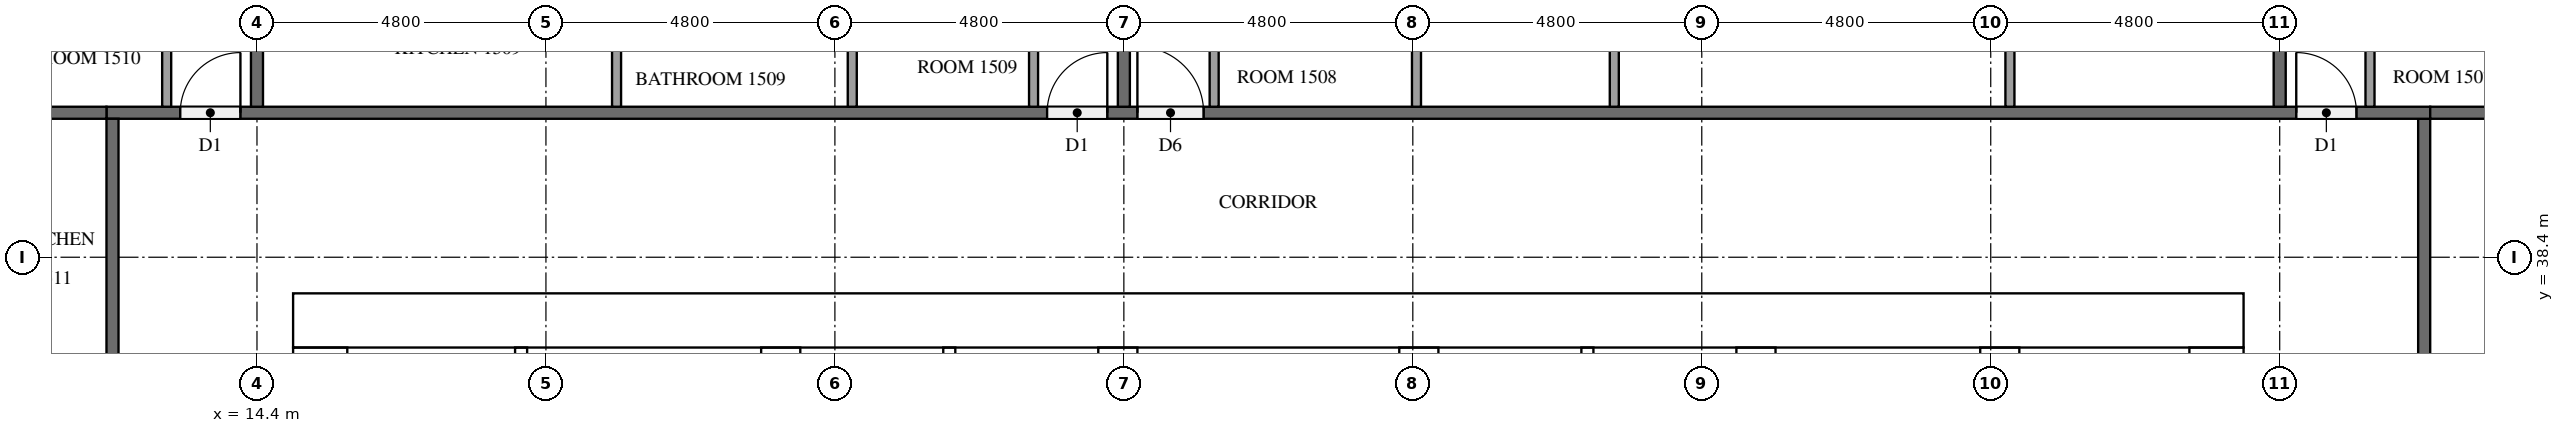
"""IFC4 building model, lengths in metres.
Left out: names, types, materials, properties, quantities, classifications, styles, units other than length and angle.
Written with IfcOpenShell. Run it as: python <this file> out.ifc"""

import sys

from ifc_helpers import new_model, si_unit, direction, frame, frame_2d, origin, place, context, subcontext, project, spatial, rectangle, extrude, element, fill, save


model = new_model("IFC4")
c1 = context("Model", 3, precision=1e-05, world=origin(), true_north=direction((0.0, 1.0)))
c2 = subcontext(c1, "Body", "Model", "MODEL_VIEW")
j1 = project(units=[si_unit("LENGTHUNIT", "METRE"), si_unit("PLANEANGLEUNIT", "RADIAN")], contexts=[c1])
p1 = place(None, origin())
s1 = spatial("IfcSite", under=j1, at=p1, CompositionType="ELEMENT")
p2 = place(p1, origin())
s2 = spatial("IfcBuilding", under=s1, at=p2, CompositionType="ELEMENT")
p3 = place(p2, frame((0.0, 0.0, 62.8)))
s3 = spatial("IfcBuildingStorey", under=s2, at=p3, CompositionType="ELEMENT", Elevation=62.8)
p4 = place(p3, frame((15.0, 37.35, 0.0), z_axis=(0.0, 0.0, 1.0), x_axis=(1.0, 0.0, 0.0)))
e1 = element("IfcWall", 1, at=p4, inside=s3, PredefinedType="SHEAR", context=c2, shape_type="SweptSolid", body=[
    extrude(rectangle(XDim=32.4, YDim=0.9, at=frame_2d((16.2, 0.0))), origin(), (0.0, 0.0, 1.0), 3.2),
])
p5 = place(p4, frame((15.3, 0.0, 0.0)))
e2 = element("IfcOpeningElement", 2, at=p5, cuts=e1, PredefinedType="OPENING", context=c2, shape_type="SweptSolid", body=[
    extrude(rectangle(XDim=1.8, YDim=2.1, at=frame_2d((0.9, 1.05))), frame((0.0, 0.46, 0.0), z_axis=(0.0, -1.0, 0.0), x_axis=(1.0, 0.0, 0.0)), (0.0, 0.0, 1.0), 0.92),
])
p6 = place(p4, frame((1.794, 0.0, 0.0)))
e3 = element("IfcOpeningElement", 3, at=p6, cuts=e1, PredefinedType="OPENING", context=c2, shape_type="SweptSolid", body=[
    extrude(rectangle(XDim=1.0, YDim=2.1, at=frame_2d((0.5, 1.05))), frame((0.0, 0.46, 0.0), z_axis=(0.0, -1.0, 0.0), x_axis=(1.0, 0.0, 0.0)), (0.0, 0.0, 1.0), 0.92),
])
p7 = place(p4, frame((5.331, 0.0, 0.0)))
e4 = element("IfcOpeningElement", 4, at=p7, cuts=e1, PredefinedType="OPENING", context=c2, shape_type="SweptSolid", body=[
    extrude(rectangle(XDim=1.0, YDim=2.1, at=frame_2d((0.5, 1.05))), frame((0.0, 0.46, 0.0), z_axis=(0.0, -1.0, 0.0), x_axis=(1.0, 0.0, 0.0)), (0.0, 0.0, 1.0), 0.92),
])
p8 = place(p3, frame((15.45, 15.9, 0.0), z_axis=(0.0, 0.0, 1.0), x_axis=(0.0, 1.0, 0.0)))
e5 = element("IfcWall", 5, at=p8, inside=s3, PredefinedType="SHEAR", context=c2, shape_type="SweptSolid", body=[
    extrude(rectangle(XDim=21.0, YDim=0.9, at=frame_2d((10.5, 0.0))), origin(), (0.0, 0.0, 1.0), 3.2),
])
p9 = place(p8, frame((4.86, 0.0, 0.0)))
e6 = element("IfcOpeningElement", 6, at=p9, cuts=e5, PredefinedType="OPENING", context=c2, shape_type="SweptSolid", body=[
    extrude(rectangle(XDim=1.2, YDim=2.1, at=frame_2d((0.6, 1.05))), frame((0.0, 0.46, 0.0), z_axis=(0.0, -1.0, 0.0), x_axis=(1.0, 0.0, 0.0)), (0.0, 0.0, 1.0), 0.92),
])
p10 = place(p3, frame((46.95, 15.9, 0.0), z_axis=(0.0, 0.0, 1.0), x_axis=(0.0, 1.0, 0.0)))
e7 = element("IfcWall", 7, at=p10, inside=s3, PredefinedType="SHEAR", context=c2, shape_type="SweptSolid", body=[
    extrude(rectangle(XDim=21.0, YDim=0.9, at=frame_2d((10.5, 0.0))), origin(), (0.0, 0.0, 1.0), 3.2),
])
p11 = place(p10, frame((10.2, 0.0, 0.0)))
e8 = element("IfcOpeningElement", 8, at=p11, cuts=e7, PredefinedType="OPENING", context=c2, shape_type="SweptSolid", body=[
    extrude(rectangle(XDim=1.2, YDim=2.1, at=frame_2d((0.6, 1.05))), frame((0.0, 0.46, 0.0), z_axis=(0.0, -1.0, 0.0), x_axis=(1.0, 0.0, 0.0)), (0.0, 0.0, 1.0), 0.92),
])
p12 = place(p3, frame((23.1, 15.9, 0.0), z_axis=(0.0, 0.0, 1.0), x_axis=(0.0, 1.0, 0.0)))
e9 = element("IfcWall", 9, at=p12, inside=s3, PredefinedType="SHEAR", context=c2, shape_type="SweptSolid", body=[
    extrude(rectangle(XDim=21.0, YDim=0.65, at=frame_2d((10.5, 0.0))), origin(), (0.0, 0.0, 1.0), 3.2),
])
p13 = place(p3, frame((39.3, 27.75, 0.0), z_axis=(0.0, 0.0, 1.0), x_axis=(0.0, 1.0, 0.0)))
e10 = element("IfcWall", 10, at=p13, inside=s3, PredefinedType="SHEAR", context=c2, shape_type="SweptSolid", body=[
    extrude(rectangle(XDim=9.15, YDim=0.65, at=frame_2d((4.575, 0.0))), origin(), (0.0, 0.0, 1.0), 3.2),
])
p14 = place(p3, frame((43.35, 27.75, 0.0), z_axis=(0.0, 0.0, 1.0), x_axis=(0.0, 1.0, 0.0)))
e11 = element("IfcWall", 11, at=p14, inside=s3, PredefinedType="SHEAR", context=c2, shape_type="SweptSolid", body=[
    extrude(rectangle(XDim=9.15, YDim=0.65, at=frame_2d((4.575, 0.0))), origin(), (0.0, 0.0, 1.0), 3.2),
])
p15 = place(p14, frame((7.65, 0.0, 0.0)))
e12 = element("IfcOpeningElement", 12, at=p15, cuts=e11, PredefinedType="OPENING", context=c2, shape_type="SweptSolid", body=[
    extrude(rectangle(XDim=1.2, YDim=2.1, at=frame_2d((0.6, 1.05))), frame((0.0, 0.335, 0.0), z_axis=(0.0, -1.0, 0.0), x_axis=(1.0, 0.0, 0.0)), (0.0, 0.0, 1.0), 0.67),
])
for number, where, z_axis, x_axis in (
    (13, (28.7, 33.875, 0.0), (0.0, 0.0, 1.0), (0.0, 1.0, 0.0)),
    (14, (33.7, 33.875, 0.0), (0.0, 0.0, 1.0), (0.0, 1.0, 0.0)),
):
    element("IfcWall", number, at=place(p3, frame(where, z_axis=z_axis, x_axis=x_axis)), inside=s3, PredefinedType="SHEAR", context=c2, shape_type="SweptSolid", body=[
        extrude(rectangle(XDim=3.025, YDim=0.65, at=frame_2d((1.512, 0.0))), origin(), (0.0, 0.0, 1.0), 3.2),
    ])
for number, where, z_axis, x_axis in (
    (15, (25.9, 33.875, 0.0), (0.0, 0.0, 1.0), (0.0, 1.0, 0.0)),
    (16, (36.5, 33.875, 0.0), (0.0, 0.0, 1.0), (0.0, 1.0, 0.0)),
):
    element("IfcWall", number, at=place(p3, frame(where, z_axis=z_axis, x_axis=x_axis)), inside=s3, PredefinedType="SOLIDWALL", context=c2, shape_type="SweptSolid", body=[
        extrude(rectangle(XDim=3.025, YDim=0.2, at=frame_2d((1.512, 0.0))), origin(), (0.0, 0.0, 1.0), 3.2),
    ])
p16 = place(p3, frame((18.788, 31.575, 0.0), z_axis=(0.0, 0.0, 1.0), x_axis=(0.0, 1.0, 0.0)))
e17 = element("IfcWall", 17, at=p16, inside=s3, PredefinedType="PARTITIONING", context=c2, shape_type="SweptSolid", body=[
    extrude(rectangle(XDim=5.325, YDim=0.2, at=frame_2d((2.663, 0.0))), origin(), (0.0, 0.0, 1.0), 3.2),
])
p17 = place(p3, frame((50.4, 40.7, 0.0), z_axis=(0.0, 0.0, 1.0), x_axis=(0.0, -1.0, 0.0)))
e18 = element("IfcWall", 18, at=p17, inside=s3, PredefinedType="PARTITIONING", context=c2, shape_type="SweptSolid", body=[
    extrude(rectangle(XDim=28.6, YDim=0.2, at=frame_2d((14.3, 0.0))), origin(), (0.0, 0.0, 1.0), 3.2),
])
p18 = place(p17, frame((24.175, 0.0, 0.0)))
e19 = element("IfcOpeningElement", 19, at=p18, cuts=e18, PredefinedType="OPENING", context=c2, shape_type="SweptSolid", body=[
    extrude(rectangle(XDim=1.0, YDim=2.1, at=frame_2d((0.5, 1.05))), frame((0.0, 0.11, 0.0), z_axis=(0.0, -1.0, 0.0), x_axis=(1.0, 0.0, 0.0)), (0.0, 0.0, 1.0), 0.22),
])
p19 = place(p17, frame((22.625, 0.0, 0.0)))
e20 = element("IfcOpeningElement", 20, at=p19, cuts=e18, PredefinedType="OPENING", context=c2, shape_type="SweptSolid", body=[
    extrude(rectangle(XDim=1.0, YDim=2.1, at=frame_2d((0.5, 1.05))), frame((0.0, 0.11, 0.0), z_axis=(0.0, -1.0, 0.0), x_axis=(1.0, 0.0, 0.0)), (0.0, 0.0, 1.0), 0.22),
])
p20 = place(p17, frame((10.625, 0.0, 0.0)))
e21 = element("IfcOpeningElement", 21, at=p20, cuts=e18, PredefinedType="OPENING", context=c2, shape_type="SweptSolid", body=[
    extrude(rectangle(XDim=1.0, YDim=2.1, at=frame_2d((0.5, 1.05))), frame((0.0, 0.11, 0.0), z_axis=(0.0, -1.0, 0.0), x_axis=(1.0, 0.0, 0.0)), (0.0, 0.0, 1.0), 0.22),
])
p21 = place(p3, frame((11.9, 40.8, 0.0), z_axis=(0.0, 0.0, 1.0), x_axis=(1.0, 0.0, 0.0)))
e22 = element("IfcWall", 22, at=p21, inside=s3, PredefinedType="PARTITIONING", context=c2, shape_type="SweptSolid", body=[
    extrude(rectangle(XDim=38.6, YDim=0.2, at=frame_2d((19.3, 0.0))), origin(), (0.0, 0.0, 1.0), 3.2),
])
p22 = place(p21, frame((36.375, 0.0, 0.0)))
e23 = element("IfcOpeningElement", 23, at=p22, cuts=e22, PredefinedType="OPENING", context=c2, shape_type="SweptSolid", body=[
    extrude(rectangle(XDim=1.0, YDim=2.1, at=frame_2d((0.5, 1.05))), frame((0.0, 0.11, 0.0), z_axis=(0.0, -1.0, 0.0), x_axis=(1.0, 0.0, 0.0)), (0.0, 0.0, 1.0), 0.22),
])
p23 = place(p21, frame((17.125, 0.0, 0.0)))
e24 = element("IfcOpeningElement", 24, at=p23, cuts=e22, PredefinedType="OPENING", context=c2, shape_type="SweptSolid", body=[
    extrude(rectangle(XDim=1.1, YDim=2.1, at=frame_2d((0.55, 1.05))), frame((0.0, 0.11, 0.0), z_axis=(0.0, -1.0, 0.0), x_axis=(1.0, 0.0, 0.0)), (0.0, 0.0, 1.0), 0.22),
])
p24 = place(p21, frame((15.625, 0.0, 0.0)))
e25 = element("IfcOpeningElement", 25, at=p24, cuts=e22, PredefinedType="OPENING", context=c2, shape_type="SweptSolid", body=[
    extrude(rectangle(XDim=1.0, YDim=2.1, at=frame_2d((0.5, 1.05))), frame((0.0, 0.11, 0.0), z_axis=(0.0, -1.0, 0.0), x_axis=(1.0, 0.0, 0.0)), (0.0, 0.0, 1.0), 0.22),
])
p25 = place(p21, frame((1.225, 0.0, 0.0)))
e26 = element("IfcOpeningElement", 26, at=p25, cuts=e22, PredefinedType="OPENING", context=c2, shape_type="SweptSolid", body=[
    extrude(rectangle(XDim=1.0, YDim=2.1, at=frame_2d((0.5, 1.05))), frame((0.0, 0.11, 0.0), z_axis=(0.0, -1.0, 0.0), x_axis=(1.0, 0.0, 0.0)), (0.0, 0.0, 1.0), 0.22),
])
p26 = place(p3, frame((12.0, 12.1, 0.0), z_axis=(0.0, 0.0, 1.0), x_axis=(0.0, 1.0, 0.0)))
e27 = element("IfcWall", 27, at=p26, inside=s3, PredefinedType="PARTITIONING", context=c2, shape_type="SweptSolid", body=[
    extrude(rectangle(XDim=28.6, YDim=0.2, at=frame_2d((14.3, 0.0))), origin(), (0.0, 0.0, 1.0), 3.2),
])
p27 = place(p26, frame((19.375, 0.0, 0.0)))
e28 = element("IfcOpeningElement", 28, at=p27, cuts=e27, PredefinedType="OPENING", context=c2, shape_type="SweptSolid", body=[
    extrude(rectangle(XDim=1.0, YDim=2.1, at=frame_2d((0.5, 1.05))), frame((0.0, 0.11, 0.0), z_axis=(0.0, -1.0, 0.0), x_axis=(1.0, 0.0, 0.0)), (0.0, 0.0, 1.0), 0.22),
])
p28 = place(p26, frame((12.175, 0.0, 0.0)))
e29 = element("IfcOpeningElement", 29, at=p28, cuts=e27, PredefinedType="OPENING", context=c2, shape_type="SweptSolid", body=[
    extrude(rectangle(XDim=1.0, YDim=2.1, at=frame_2d((0.5, 1.05))), frame((0.0, 0.11, 0.0), z_axis=(0.0, -1.0, 0.0), x_axis=(1.0, 0.0, 0.0)), (0.0, 0.0, 1.0), 0.22),
])
p29 = place(p26, frame((2.575, 0.0, 0.0)))
e30 = element("IfcOpeningElement", 30, at=p29, cuts=e27, PredefinedType="OPENING", context=c2, shape_type="SweptSolid", body=[
    extrude(rectangle(XDim=1.0, YDim=2.1, at=frame_2d((0.5, 1.05))), frame((0.0, 0.11, 0.0), z_axis=(0.0, -1.0, 0.0), x_axis=(1.0, 0.0, 0.0)), (0.0, 0.0, 1.0), 0.22),
])
p30 = place(p26, frame((1.025, 0.0, 0.0)))
e31 = element("IfcOpeningElement", 31, at=p30, cuts=e27, PredefinedType="OPENING", context=c2, shape_type="SweptSolid", body=[
    extrude(rectangle(XDim=1.0, YDim=2.1, at=frame_2d((0.5, 1.05))), frame((0.0, 0.11, 0.0), z_axis=(0.0, -1.0, 0.0), x_axis=(1.0, 0.0, 0.0)), (0.0, 0.0, 1.0), 0.22),
])
p31 = place(p3, frame((50.5, 40.8, 0.0), z_axis=(0.0, 0.0, 1.0), x_axis=(1.0, 0.0, 0.0)))
e32 = element("IfcWall", 32, at=p31, inside=s3, PredefinedType="PARTITIONING", context=c2, shape_type="SweptSolid", body=[
    extrude(rectangle(XDim=11.8, YDim=0.2, at=frame_2d((5.9, 0.0))), origin(), (0.0, 0.0, 1.0), 3.2),
])
for number, where, z_axis, x_axis in (
    (33, (48.0, 47.575, 0.0), (0.0, 0.0, 1.0), (0.0, -1.0, 0.0)),
    (34, (28.8, 47.575, 0.0), (0.0, 0.0, 1.0), (0.0, -1.0, 0.0)),
):
    element("IfcWall", number, at=place(p3, frame(where, z_axis=z_axis, x_axis=x_axis)), inside=s3, PredefinedType="PARTITIONING", context=c2, shape_type="SweptSolid", body=[
        extrude(rectangle(XDim=6.675, YDim=0.2, at=frame_2d((3.337, 0.0))), origin(), (0.0, 0.0, 1.0), 3.2),
    ])
for number, where, z_axis, x_axis in (
    (35, (14.4, 47.9, 0.0), (0.0, 0.0, 1.0), (0.0, -1.0, 0.0)),
    (36, (4.9, 40.8, 0.0), (0.0, 0.0, 1.0), (1.0, 0.0, 0.0)),
):
    element("IfcWall", number, at=place(p3, frame(where, z_axis=z_axis, x_axis=x_axis)), inside=s3, PredefinedType="PARTITIONING", context=c2, shape_type="SweptSolid", body=[
        extrude(rectangle(XDim=7.0, YDim=0.2, at=frame_2d((3.5, 0.0))), origin(), (0.0, 0.0, 1.0), 3.2),
    ])
p32 = place(p3, frame((49.5, 40.9, 0.0), z_axis=(0.0, 0.0, 1.0), x_axis=(0.0, 1.0, 0.0)))
e37 = element("IfcWall", 37, at=p32, inside=s3, PredefinedType="PARTITIONING", context=c2, shape_type="SweptSolid", body=[
    extrude(rectangle(XDim=1.925, YDim=0.15, at=frame_2d((0.962, 0.0))), origin(), (0.0, 0.0, 1.0), 3.2),
])
for number, where, z_axis, x_axis in (
    (38, (33.661, 40.9, 0.0), (0.0, 0.0, 1.0), (0.0, 1.0, 0.0)),
    (39, (36.947, 40.9, 0.0), (0.0, 0.0, 1.0), (0.0, 1.0, 0.0)),
    (40, (43.519, 40.9, 0.0), (0.0, 0.0, 1.0), (0.0, 1.0, 0.0)),
):
    element("IfcWall", number, at=place(p3, frame(where, z_axis=z_axis, x_axis=x_axis)), inside=s3, PredefinedType="PARTITIONING", context=c2, shape_type="SweptSolid", body=[
        extrude(rectangle(XDim=2.375, YDim=0.15, at=frame_2d((1.188, 0.0))), origin(), (0.0, 0.0, 1.0), 3.2),
    ])
p33 = place(p3, frame((30.3, 40.9, 0.0), z_axis=(0.0, 0.0, 1.0), x_axis=(0.0, 1.0, 0.0)))
e41 = element("IfcWall", 41, at=p33, inside=s3, PredefinedType="PARTITIONING", context=c2, shape_type="SweptSolid", body=[
    extrude(rectangle(XDim=2.525, YDim=0.15, at=frame_2d((1.263, 0.0))), origin(), (0.0, 0.0, 1.0), 3.2),
])
for number, where, z_axis, x_axis in (
    (42, (24.289, 40.9, 0.0), (0.0, 0.0, 1.0), (0.0, 1.0, 0.0)),
    (43, (20.373, 40.9, 0.0), (0.0, 0.0, 1.0), (0.0, 1.0, 0.0)),
):
    element("IfcWall", number, at=place(p3, frame(where, z_axis=z_axis, x_axis=x_axis)), inside=s3, PredefinedType="PARTITIONING", context=c2, shape_type="SweptSolid", body=[
        extrude(rectangle(XDim=1.775, YDim=0.15, at=frame_2d((0.888, 0.0))), origin(), (0.0, 0.0, 1.0), 3.2),
    ])
for number, where, z_axis, x_axis in (
    (44, (27.3, 40.9, 0.0), (0.0, 0.0, 1.0), (0.0, 1.0, 0.0)),
    (45, (12.9, 40.9, 0.0), (0.0, 0.0, 1.0), (0.0, 1.0, 0.0)),
):
    element("IfcWall", number, at=place(p3, frame(where, z_axis=z_axis, x_axis=x_axis)), inside=s3, PredefinedType="PARTITIONING", context=c2, shape_type="SweptSolid", body=[
        extrude(rectangle(XDim=1.925, YDim=0.15, at=frame_2d((0.962, 0.0))), origin(), (0.0, 0.0, 1.0), 3.2),
    ])
p34 = place(p5, origin())
e46 = element("IfcDoor", 46, at=p34, inside=s3, OperationType="DOUBLE_DOOR_SINGLE_SWING", PredefinedType="DOOR", context=c2, shape_type="SweptSolid", body=[
    extrude(rectangle(XDim=1.8, YDim=2.1, at=frame_2d((0.9, 1.05))), frame((0.0, 0.025, 0.0), z_axis=(0.0, -1.0, 0.0), x_axis=(1.0, 0.0, 0.0)), (0.0, 0.0, 1.0), 0.05),
])
fill(e2, e46)
p35 = place(p6, origin())
e47 = element("IfcDoor", 47, at=p35, inside=s3, OperationType="SINGLE_SWING_RIGHT", PredefinedType="DOOR", context=c2, shape_type="SweptSolid", body=[
    extrude(rectangle(XDim=1.0, YDim=2.1, at=frame_2d((0.5, 1.05))), frame((0.0, 0.025, 0.0), z_axis=(0.0, -1.0, 0.0), x_axis=(1.0, 0.0, 0.0)), (0.0, 0.0, 1.0), 0.05),
])
fill(e3, e47)
p36 = place(p7, origin())
e48 = element("IfcDoor", 48, at=p36, inside=s3, OperationType="SINGLE_SWING_LEFT", PredefinedType="DOOR", context=c2, shape_type="SweptSolid", body=[
    extrude(rectangle(XDim=1.0, YDim=2.1, at=frame_2d((0.5, 1.05))), frame((0.0, 0.025, 0.0), z_axis=(0.0, -1.0, 0.0), x_axis=(1.0, 0.0, 0.0)), (0.0, 0.0, 1.0), 0.05),
])
fill(e4, e48)
p37 = place(p22, origin())
e49 = element("IfcDoor", 49, at=p37, inside=s3, OperationType="SINGLE_SWING_LEFT", PredefinedType="DOOR", context=c2, shape_type="SweptSolid", body=[
    extrude(rectangle(XDim=1.0, YDim=2.1, at=frame_2d((0.5, 1.05))), frame((0.0, 0.025, 0.0), z_axis=(0.0, -1.0, 0.0), x_axis=(1.0, 0.0, 0.0)), (0.0, 0.0, 1.0), 0.05),
])
fill(e23, e49)
p38 = place(p23, origin())
e50 = element("IfcDoor", 50, at=p38, inside=s3, OperationType="SINGLE_SWING_LEFT", PredefinedType="DOOR", context=c2, shape_type="SweptSolid", body=[
    extrude(rectangle(XDim=1.1, YDim=2.1, at=frame_2d((0.55, 1.05))), frame((0.0, 0.025, 0.0), z_axis=(0.0, -1.0, 0.0), x_axis=(1.0, 0.0, 0.0)), (0.0, 0.0, 1.0), 0.05),
])
fill(e24, e50)
p39 = place(p24, origin())
e51 = element("IfcDoor", 51, at=p39, inside=s3, OperationType="SINGLE_SWING_RIGHT", PredefinedType="DOOR", context=c2, shape_type="SweptSolid", body=[
    extrude(rectangle(XDim=1.0, YDim=2.1, at=frame_2d((0.5, 1.05))), frame((0.0, 0.025, 0.0), z_axis=(0.0, -1.0, 0.0), x_axis=(1.0, 0.0, 0.0)), (0.0, 0.0, 1.0), 0.05),
])
fill(e25, e51)
p40 = place(p25, origin())
e52 = element("IfcDoor", 52, at=p40, inside=s3, OperationType="SINGLE_SWING_RIGHT", PredefinedType="DOOR", context=c2, shape_type="SweptSolid", body=[
    extrude(rectangle(XDim=1.0, YDim=2.1, at=frame_2d((0.5, 1.05))), frame((0.0, 0.025, 0.0), z_axis=(0.0, -1.0, 0.0), x_axis=(1.0, 0.0, 0.0)), (0.0, 0.0, 1.0), 0.05),
])
fill(e26, e52)
save(model, sys.argv[1])
